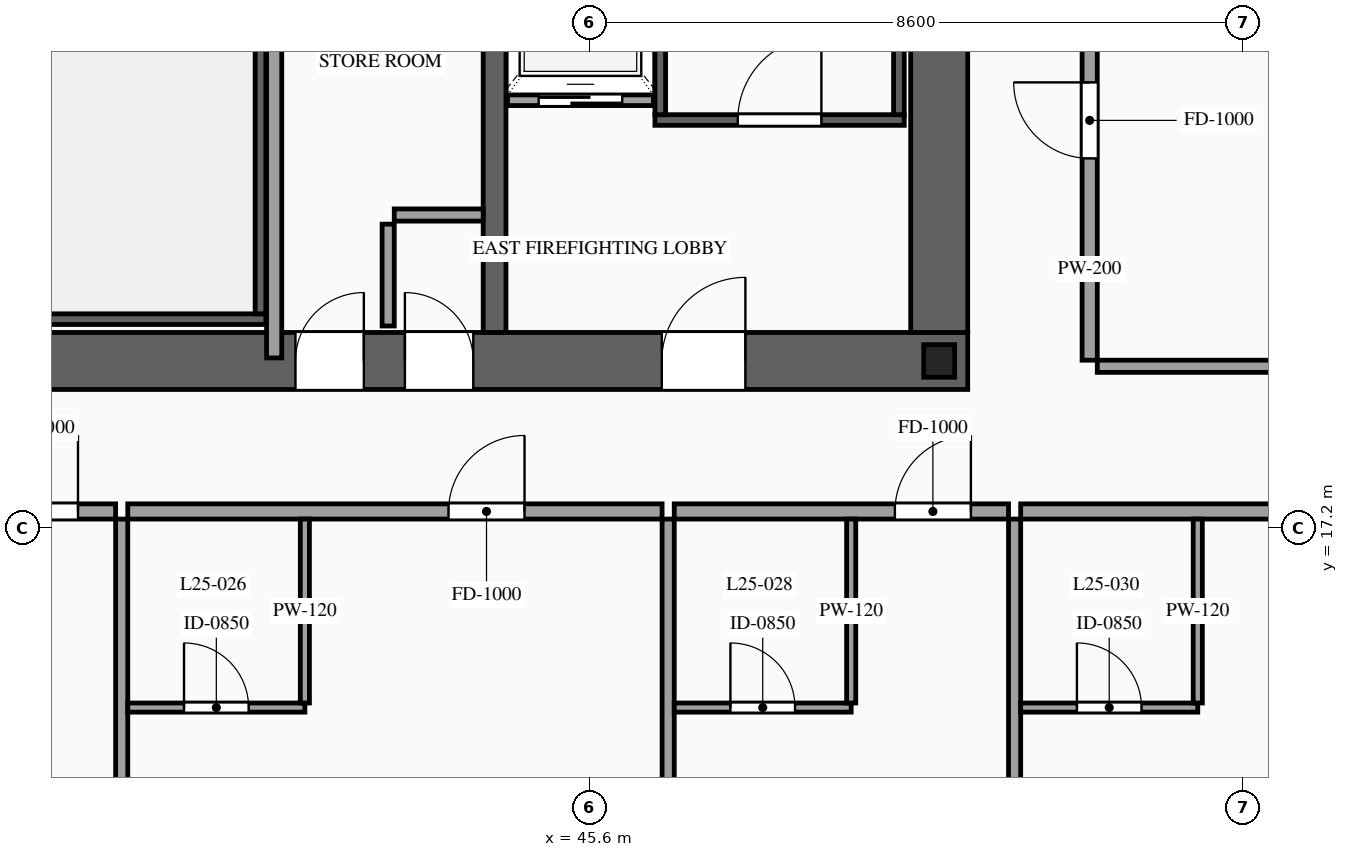
"""IFC4 building model, lengths in metres.
Left out: names, types, materials, properties, quantities, classifications, styles, units other than length and angle.
Written with IfcOpenShell. Run it as: python <this file> out.ifc"""

import sys

from ifc_helpers import new_model, si_unit, direction, frame, frame_2d, origin, origin_2d, place, context, subcontext, project, spatial, rectangle, i_section, extrude, source, transform, mapped, element, fill, save


model = new_model("IFC4")
c1 = context("Model", 3, precision=1e-05, world=origin(), true_north=direction((0.0, 1.0)))
c2 = subcontext(c1, "Body", "Model", "MODEL_VIEW")
j1 = project(units=[si_unit("LENGTHUNIT", "METRE"), si_unit("PLANEANGLEUNIT", "RADIAN")], contexts=[c1])
p1 = place(None, origin())
s1 = spatial("IfcSite", under=j1, at=p1, CompositionType="ELEMENT")
p2 = place(p1, origin())
s2 = spatial("IfcBuilding", under=s1, at=p2, CompositionType="ELEMENT")
p3 = place(p2, frame((0.0, 0.0, 97.4)))
s3 = spatial("IfcBuildingStorey", under=s2, at=p3, CompositionType="ELEMENT", Elevation=97.4)
p4 = place(p3, frame((23.425, 19.4, 0.0), z_axis=(0.0, 0.0, 1.0), x_axis=(1.0, 0.0, 0.0)))
e1 = element("IfcWall", 1, at=p4, inside=s3, PredefinedType="SHEAR", context=c2, shape_type="SweptSolid", body=[
    extrude(rectangle(XDim=27.15, YDim=0.75, at=frame_2d((13.575, 0.0))), origin(), (0.0, 0.0, 1.0), 3.6),
])
p5 = place(p4, frame((2.025, 0.0, 0.0)))
e2 = element("IfcOpeningElement", 2, at=p5, cuts=e1, PredefinedType="OPENING", context=c2, shape_type="SweptSolid", body=[
    extrude(rectangle(XDim=1.1, YDim=2.2, at=frame_2d((0.55, 1.1))), frame((0.0, 0.39, 0.0), z_axis=(0.0, -1.0, 0.0), x_axis=(1.0, 0.0, 0.0)), (0.0, 0.0, 1.0), 0.78),
])
p6 = place(p4, frame((9.925, 0.0, 0.0)))
e3 = element("IfcOpeningElement", 3, at=p6, cuts=e1, PredefinedType="OPENING", context=c2, shape_type="SweptSolid", body=[
    extrude(rectangle(XDim=1.1, YDim=2.2, at=frame_2d((0.55, 1.1))), frame((0.0, 0.39, 0.0), z_axis=(0.0, -1.0, 0.0), x_axis=(1.0, 0.0, 0.0)), (0.0, 0.0, 1.0), 0.78),
])
p7 = place(p4, frame((23.125, 0.0, 0.0)))
e4 = element("IfcOpeningElement", 4, at=p7, cuts=e1, PredefinedType="OPENING", context=c2, shape_type="SweptSolid", body=[
    extrude(rectangle(XDim=1.1, YDim=2.2, at=frame_2d((0.55, 1.1))), frame((0.0, 0.39, 0.0), z_axis=(0.0, -1.0, 0.0), x_axis=(1.0, 0.0, 0.0)), (0.0, 0.0, 1.0), 0.78),
])
p8 = place(p4, frame((19.745, 0.0, 0.0)))
e5 = element("IfcOpeningElement", 5, at=p8, cuts=e1, PredefinedType="OPENING", context=c2, shape_type="SweptSolid", body=[
    extrude(rectangle(XDim=0.9, YDim=2.15, at=frame_2d((0.45, 1.075))), frame((0.0, 0.39, 0.0), z_axis=(0.0, -1.0, 0.0), x_axis=(1.0, 0.0, 0.0)), (0.0, 0.0, 1.0), 0.78),
])
p9 = place(p4, frame((18.305, 0.0, 0.0)))
e6 = element("IfcOpeningElement", 6, at=p9, cuts=e1, PredefinedType="OPENING", context=c2, shape_type="SweptSolid", body=[
    extrude(rectangle(XDim=0.9, YDim=2.15, at=frame_2d((0.45, 1.075))), frame((0.0, 0.39, 0.0), z_axis=(0.0, -1.0, 0.0), x_axis=(1.0, 0.0, 0.0)), (0.0, 0.0, 1.0), 0.78),
])
m1 = source(origin(), c2, "Body", "SweptSolid", [
    extrude(rectangle(XDim=12.05, YDim=0.75, at=frame_2d((6.025, 0.0))), origin(), (0.0, 0.0, 1.0), 3.6),
])
p10 = place(p3, frame((50.2, 19.775, 0.0), z_axis=(0.0, 0.0, 1.0), x_axis=(0.0, 1.0, 0.0)))
e7 = element("IfcWall", 7, at=p10, inside=s3, PredefinedType="SHEAR", context=c2, shape_type="MappedRepresentation", body=[
    mapped(m1, transform((0.0, 0.0, 0.0), scale=1.0)),
])
m2 = source(origin(), c2, "Body", "SweptSolid", [
    extrude(rectangle(XDim=12.05, YDim=0.3, at=frame_2d((6.025, 0.0))), origin(), (0.0, 0.0, 1.0), 3.6),
])
p11 = place(p3, frame((44.35, 19.775, 0.0), z_axis=(0.0, 0.0, 1.0), x_axis=(0.0, 1.0, 0.0)))
e8 = element("IfcWall", 8, at=p11, inside=s3, PredefinedType="SOLIDWALL", context=c2, shape_type="MappedRepresentation", body=[
    mapped(m2, transform((0.0, 0.0, 0.0), scale=1.0)),
])
m3 = source(origin(), c2, "Body", "SweptSolid", [
    extrude(i_section(OverallWidth=0.407, OverallDepth=0.428, WebThickness=0.02, FlangeThickness=0.035, at=origin_2d()), origin(), (0.0, 0.0, 1.0), 3.6),
])
p12 = place(p3, frame((50.2, 19.4, 0.0), z_axis=(0.0, 0.0, 1.0), x_axis=(1.0, 0.0, 0.0)))
e9 = element("IfcColumn", 9, at=p12, inside=s3, PredefinedType="COLUMN", context=c2, shape_type="MappedRepresentation", body=[
    mapped(m3, transform((0.0, 0.0, 0.0), scale=1.0)),
])
p13 = place(p3, frame((44.52, 22.83, 0.0), z_axis=(0.0, 0.0, 1.0), x_axis=(1.0, 0.0, 0.0)))
e10 = element("IfcWall", 10, at=p13, inside=s3, PredefinedType="SOLIDWALL", context=c2, shape_type="SweptSolid", body=[
    extrude(rectangle(XDim=1.92, YDim=0.14, at=frame_2d((0.96, 0.0))), origin(), (0.0, 0.0, 1.0), 3.38),
])
p14 = place(p13, frame((0.41, 0.0, 0.0)))
e11 = element("IfcOpeningElement", 11, at=p14, cuts=e10, PredefinedType="OPENING", context=c2, shape_type="SweptSolid", body=[
    extrude(rectangle(XDim=1.1, YDim=2.2, at=frame_2d((0.55, 1.1))), frame((0.0, 0.085, 0.0), z_axis=(0.0, -1.0, 0.0), x_axis=(1.0, 0.0, 0.0)), (0.0, 0.0, 1.0), 0.17),
])
p15 = place(p3, frame((46.46, 22.57, 0.0), z_axis=(0.0, 0.0, 1.0), x_axis=(1.0, 0.0, 0.0)))
e12 = element("IfcWall", 12, at=p15, inside=s3, PredefinedType="SOLIDWALL", context=c2, shape_type="SweptSolid", body=[
    extrude(rectangle(XDim=3.28, YDim=0.14, at=frame_2d((1.64, 0.0))), origin(), (0.0, 0.0, 1.0), 3.38),
])
p16 = place(p15, frame((1.09, 0.0, 0.0)))
e13 = element("IfcOpeningElement", 13, at=p16, cuts=e12, PredefinedType="OPENING", context=c2, shape_type="SweptSolid", body=[
    extrude(rectangle(XDim=1.1, YDim=2.2, at=frame_2d((0.55, 1.1))), frame((0.0, 0.085, 0.0), z_axis=(0.0, -1.0, 0.0), x_axis=(1.0, 0.0, 0.0)), (0.0, 0.0, 1.0), 0.17),
])
m4 = source(origin(), c2, "Body", "SweptSolid", [
    extrude(rectangle(XDim=8.94, YDim=0.14, at=frame_2d((4.47, 0.0))), origin(), (0.0, 0.0, 1.0), 3.38),
])
for number, where, z_axis, x_axis in (
    (14, (46.53, 22.64, 0.0), (0.0, 0.0, 1.0), (0.0, 1.0, 0.0)),
    (15, (49.67, 22.64, 0.0), (0.0, 0.0, 1.0), (0.0, 1.0, 0.0)),
):
    element("IfcWall", number, at=place(p3, frame(where, z_axis=z_axis, x_axis=x_axis)), inside=s3, PredefinedType="SOLIDWALL", context=c2, shape_type="MappedRepresentation", body=[
        mapped(m4, transform((0.0, 0.0, 0.0), scale=1.0)),
    ])
m5 = source(origin(), c2, "Body", "SweptSolid", [
    extrude(rectangle(XDim=3.14, YDim=0.14, at=frame_2d((1.57, 0.0))), origin(), (0.0, 0.0, 1.0), 3.38),
])
p17 = place(p3, frame((38.2, 19.95, 0.0), z_axis=(0.0, 0.0, 1.0), x_axis=(1.0, 0.0, 0.0)))
e16 = element("IfcWall", 16, at=p17, inside=s3, PredefinedType="SOLIDWALL", context=c2, shape_type="MappedRepresentation", body=[
    mapped(m5, transform((0.0, 0.0, 0.0), scale=1.0)),
])
m6 = source(origin(), c2, "Body", "SweptSolid", [
    extrude(rectangle(XDim=8.94, YDim=0.14, at=frame_2d((4.47, 0.0))), origin(), (0.0, 0.0, 1.0), 3.38),
])
p18 = place(p3, frame((41.27, 20.02, 0.0), z_axis=(0.0, 0.0, 1.0), x_axis=(0.0, 1.0, 0.0)))
e17 = element("IfcWall", 17, at=p18, inside=s3, PredefinedType="SOLIDWALL", context=c2, shape_type="MappedRepresentation", body=[
    mapped(m6, transform((0.0, 0.0, 0.0), scale=1.0)),
])
m7 = source(origin(), c2, "Body", "SweptSolid", [
    extrude(rectangle(XDim=1.34, YDim=0.16, at=frame_2d((0.67, 0.0))), origin(), (0.0, 0.0, 1.0), 3.38),
])
p19 = place(p3, frame((42.95, 19.86, 0.0), z_axis=(0.0, 0.0, 1.0), x_axis=(0.0, 1.0, 0.0)))
e18 = element("IfcWall", 18, at=p19, inside=s3, PredefinedType="PARTITIONING", context=c2, shape_type="MappedRepresentation", body=[
    mapped(m7, transform((0.0, 0.0, 0.0), scale=1.0)),
])
m8 = source(origin(), c2, "Body", "SweptSolid", [
    extrude(rectangle(XDim=1.17, YDim=0.16, at=frame_2d((0.585, 0.0))), origin(), (0.0, 0.0, 1.0), 3.38),
])
p20 = place(p3, frame((43.03, 21.32, 0.0), z_axis=(0.0, 0.0, 1.0), x_axis=(1.0, 0.0, 0.0)))
e19 = element("IfcWall", 19, at=p20, inside=s3, PredefinedType="PARTITIONING", context=c2, shape_type="MappedRepresentation", body=[
    mapped(m8, transform((0.0, 0.0, 0.0), scale=1.0)),
])
m9 = source(origin(), c2, "Body", "SweptSolid", [
    extrude(rectangle(XDim=6.51, YDim=0.2, at=frame_2d((3.255, 0.0))), origin(), (0.0, 0.0, 1.0), 3.38),
])
p21 = place(p3, frame((41.45, 19.44, 0.0), z_axis=(0.0, 0.0, 1.0), x_axis=(0.0, 1.0, 0.0)))
e20 = element("IfcWall", 20, at=p21, inside=s3, PredefinedType="PARTITIONING", context=c2, shape_type="MappedRepresentation", body=[
    mapped(m9, transform((0.0, 0.0, 0.0), scale=1.0)),
])
p22 = place(p3, frame((34.965, 17.42, 0.0), z_axis=(0.0, 0.0, 1.0), x_axis=(1.0, 0.0, 0.0)))
e21 = element("IfcWall", 21, at=p22, inside=s3, PredefinedType="PARTITIONING", context=c2, shape_type="SweptSolid", body=[
    extrude(rectangle(XDim=4.399, YDim=0.2, at=frame_2d((2.199, 0.0))), origin(), (0.0, 0.0, 1.0), 3.38),
])
p23 = place(p22, frame((2.904, 0.0, 0.0)))
e22 = element("IfcOpeningElement", 22, at=p23, cuts=e21, PredefinedType="OPENING", context=c2, shape_type="SweptSolid", body=[
    extrude(rectangle(XDim=1.0, YDim=2.2, at=frame_2d((0.5, 1.1))), frame((0.0, 0.115, 0.0), z_axis=(0.0, -1.0, 0.0), x_axis=(1.0, 0.0, 0.0)), (0.0, 0.0, 1.0), 0.23),
])
m10 = source(origin(), c2, "Body", "SweptSolid", [
    extrude(rectangle(XDim=14.97, YDim=0.16, at=frame_2d((7.485, 0.0))), origin(), (0.0, 0.0, 1.0), 3.38),
])
p24 = place(p3, frame((39.444, 2.35, 0.0), z_axis=(0.0, 0.0, 1.0), x_axis=(0.0, 1.0, 0.0)))
e23 = element("IfcWall", 23, at=p24, inside=s3, PredefinedType="PARTITIONING", context=c2, shape_type="MappedRepresentation", body=[
    mapped(m10, transform((0.0, 0.0, 0.0), scale=1.0)),
])
p25 = place(p3, frame((39.524, 17.42, 0.0), z_axis=(0.0, 0.0, 1.0), x_axis=(1.0, 0.0, 0.0)))
e24 = element("IfcWall", 24, at=p25, inside=s3, PredefinedType="PARTITIONING", context=c2, shape_type="SweptSolid", body=[
    extrude(rectangle(XDim=7.03, YDim=0.2, at=frame_2d((3.515, 0.0))), origin(), (0.0, 0.0, 1.0), 3.38),
])
p26 = place(p25, frame((4.22, 0.0, 0.0)))
e25 = element("IfcOpeningElement", 25, at=p26, cuts=e24, PredefinedType="OPENING", context=c2, shape_type="SweptSolid", body=[
    extrude(rectangle(XDim=1.0, YDim=2.2, at=frame_2d((0.5, 1.1))), frame((0.0, 0.115, 0.0), z_axis=(0.0, -1.0, 0.0), x_axis=(1.0, 0.0, 0.0)), (0.0, 0.0, 1.0), 0.23),
])
p27 = place(p3, frame((46.634, 2.35, 0.0), z_axis=(0.0, 0.0, 1.0), x_axis=(0.0, 1.0, 0.0)))
e26 = element("IfcWall", 26, at=p27, inside=s3, PredefinedType="PARTITIONING", context=c2, shape_type="MappedRepresentation", body=[
    mapped(m10, transform((0.0, 0.0, 0.0), scale=1.0)),
])
p28 = place(p3, frame((39.524, 14.84, 0.0), z_axis=(0.0, 0.0, 1.0), x_axis=(1.0, 0.0, 0.0)))
e27 = element("IfcWall", 27, at=p28, inside=s3, PredefinedType="PARTITIONING", context=c2, shape_type="SweptSolid", body=[
    extrude(rectangle(XDim=2.33, YDim=0.12, at=frame_2d((1.165, 0.0))), origin(), (0.0, 0.0, 1.0), 3.38),
])
p29 = place(p28, frame((0.74, 0.0, 0.0)))
e28 = element("IfcOpeningElement", 28, at=p29, cuts=e27, PredefinedType="OPENING", context=c2, shape_type="SweptSolid", body=[
    extrude(rectangle(XDim=0.85, YDim=2.1, at=frame_2d((0.425, 1.05))), frame((0.0, 0.075, 0.0), z_axis=(0.0, -1.0, 0.0), x_axis=(1.0, 0.0, 0.0)), (0.0, 0.0, 1.0), 0.15),
])
m11 = source(origin(), c2, "Body", "SweptSolid", [
    extrude(rectangle(XDim=2.42, YDim=0.12, at=frame_2d((1.21, 0.0))), origin(), (0.0, 0.0, 1.0), 3.38),
])
p30 = place(p3, frame((41.854, 14.9, 0.0), z_axis=(0.0, 0.0, 1.0), x_axis=(0.0, 1.0, 0.0)))
e29 = element("IfcWall", 29, at=p30, inside=s3, PredefinedType="PARTITIONING", context=c2, shape_type="MappedRepresentation", body=[
    mapped(m11, transform((0.0, 0.0, 0.0), scale=1.0)),
])
p31 = place(p3, frame((46.714, 17.42, 0.0), z_axis=(0.0, 0.0, 1.0), x_axis=(1.0, 0.0, 0.0)))
e30 = element("IfcWall", 30, at=p31, inside=s3, PredefinedType="PARTITIONING", context=c2, shape_type="SweptSolid", body=[
    extrude(rectangle(XDim=4.398, YDim=0.2, at=frame_2d((2.199, 0.0))), origin(), (0.0, 0.0, 1.0), 3.38),
])
p32 = place(p31, frame((2.903, 0.0, 0.0)))
e31 = element("IfcOpeningElement", 31, at=p32, cuts=e30, PredefinedType="OPENING", context=c2, shape_type="SweptSolid", body=[
    extrude(rectangle(XDim=1.0, YDim=2.2, at=frame_2d((0.5, 1.1))), frame((0.0, 0.115, 0.0), z_axis=(0.0, -1.0, 0.0), x_axis=(1.0, 0.0, 0.0)), (0.0, 0.0, 1.0), 0.23),
])
p33 = place(p3, frame((51.192, 2.35, 0.0), z_axis=(0.0, 0.0, 1.0), x_axis=(0.0, 1.0, 0.0)))
e32 = element("IfcWall", 32, at=p33, inside=s3, PredefinedType="PARTITIONING", context=c2, shape_type="MappedRepresentation", body=[
    mapped(m10, transform((0.0, 0.0, 0.0), scale=1.0)),
])
p34 = place(p3, frame((46.714, 14.84, 0.0), z_axis=(0.0, 0.0, 1.0), x_axis=(1.0, 0.0, 0.0)))
e33 = element("IfcWall", 33, at=p34, inside=s3, PredefinedType="PARTITIONING", context=c2, shape_type="SweptSolid", body=[
    extrude(rectangle(XDim=2.328, YDim=0.12, at=frame_2d((1.164, 0.0))), origin(), (0.0, 0.0, 1.0), 3.38),
])
p35 = place(p34, frame((0.739, 0.0, 0.0)))
e34 = element("IfcOpeningElement", 34, at=p35, cuts=e33, PredefinedType="OPENING", context=c2, shape_type="SweptSolid", body=[
    extrude(rectangle(XDim=0.85, YDim=2.1, at=frame_2d((0.425, 1.05))), frame((0.0, 0.075, 0.0), z_axis=(0.0, -1.0, 0.0), x_axis=(1.0, 0.0, 0.0)), (0.0, 0.0, 1.0), 0.15),
])
p36 = place(p3, frame((49.042, 14.9, 0.0), z_axis=(0.0, 0.0, 1.0), x_axis=(0.0, 1.0, 0.0)))
e35 = element("IfcWall", 35, at=p36, inside=s3, PredefinedType="PARTITIONING", context=c2, shape_type="MappedRepresentation", body=[
    mapped(m11, transform((0.0, 0.0, 0.0), scale=1.0)),
])
p37 = place(p3, frame((51.272, 17.42, 0.0), z_axis=(0.0, 0.0, 1.0), x_axis=(1.0, 0.0, 0.0)))
e36 = element("IfcWall", 36, at=p37, inside=s3, PredefinedType="PARTITIONING", context=c2, shape_type="SweptSolid", body=[
    extrude(rectangle(XDim=6.288, YDim=0.2, at=frame_2d((3.144, 0.0))), origin(), (0.0, 0.0, 1.0), 3.38),
])
p38 = place(p37, frame((3.849, 0.0, 0.0)))
e37 = element("IfcOpeningElement", 37, at=p38, cuts=e36, PredefinedType="OPENING", context=c2, shape_type="SweptSolid", body=[
    extrude(rectangle(XDim=1.0, YDim=2.2, at=frame_2d((0.5, 1.1))), frame((0.0, 0.115, 0.0), z_axis=(0.0, -1.0, 0.0), x_axis=(1.0, 0.0, 0.0)), (0.0, 0.0, 1.0), 0.23),
])
p39 = place(p3, frame((51.272, 14.84, 0.0), z_axis=(0.0, 0.0, 1.0), x_axis=(1.0, 0.0, 0.0)))
e38 = element("IfcWall", 38, at=p39, inside=s3, PredefinedType="PARTITIONING", context=c2, shape_type="SweptSolid", body=[
    extrude(rectangle(XDim=2.33, YDim=0.12, at=frame_2d((1.165, 0.0))), origin(), (0.0, 0.0, 1.0), 3.38),
])
p40 = place(p39, frame((0.74, 0.0, 0.0)))
e39 = element("IfcOpeningElement", 39, at=p40, cuts=e38, PredefinedType="OPENING", context=c2, shape_type="SweptSolid", body=[
    extrude(rectangle(XDim=0.85, YDim=2.1, at=frame_2d((0.425, 1.05))), frame((0.0, 0.075, 0.0), z_axis=(0.0, -1.0, 0.0), x_axis=(1.0, 0.0, 0.0)), (0.0, 0.0, 1.0), 0.15),
])
p41 = place(p3, frame((53.602, 14.9, 0.0), z_axis=(0.0, 0.0, 1.0), x_axis=(0.0, 1.0, 0.0)))
e40 = element("IfcWall", 40, at=p41, inside=s3, PredefinedType="PARTITIONING", context=c2, shape_type="MappedRepresentation", body=[
    mapped(m11, transform((0.0, 0.0, 0.0), scale=1.0)),
])
p42 = place(p3, frame((52.18, 19.41, 0.0), z_axis=(0.0, 0.0, 1.0), x_axis=(0.0, 1.0, 0.0)))
e41 = element("IfcWall", 41, at=p42, inside=s3, PredefinedType="PARTITIONING", context=c2, shape_type="SweptSolid", body=[
    extrude(rectangle(XDim=6.31, YDim=0.2, at=frame_2d((3.155, 0.0))), origin(), (0.0, 0.0, 1.0), 3.38),
])
p43 = place(p42, frame((2.655, 0.0, 0.0)))
e42 = element("IfcOpeningElement", 42, at=p43, cuts=e41, PredefinedType="OPENING", context=c2, shape_type="SweptSolid", body=[
    extrude(rectangle(XDim=1.0, YDim=2.2, at=frame_2d((0.5, 1.1))), frame((0.0, 0.115, 0.0), z_axis=(0.0, -1.0, 0.0), x_axis=(1.0, 0.0, 0.0)), (0.0, 0.0, 1.0), 0.23),
])
m12 = source(origin(), c2, "Body", "SweptSolid", [
    extrude(rectangle(XDim=8.17, YDim=0.16, at=frame_2d((4.085, 0.0))), origin(), (0.0, 0.0, 1.0), 2.875),
])
p44 = place(p3, frame((52.28, 19.33, 0.0), z_axis=(0.0, 0.0, 1.0), x_axis=(1.0, 0.0, 0.0)))
e43 = element("IfcWall", 43, at=p44, inside=s3, PredefinedType="PARTITIONING", context=c2, shape_type="MappedRepresentation", body=[
    mapped(m12, transform((0.0, 0.0, 0.0), scale=1.0)),
])
m13 = source(origin(), c2, "Body", "SweptSolid", [
    extrude(rectangle(XDim=1.1, YDim=2.2, at=frame_2d((0.55, 1.1))), frame((0.0, 0.025, 0.0), z_axis=(0.0, -1.0, 0.0), x_axis=(1.0, 0.0, 0.0)), (0.0, 0.0, 1.0), 0.05),
])
p45 = place(p14, origin())
e44 = element("IfcDoor", 44, at=p45, inside=s3, OperationType="SLIDING_TO_RIGHT", PredefinedType="DOOR", context=c2, shape_type="MappedRepresentation", body=[
    mapped(m13, transform((0.0, 0.0, 0.0), scale=1.0)),
])
fill(e11, e44)
m14 = source(origin(), c2, "Body", "SweptSolid", [
    extrude(rectangle(XDim=1.1, YDim=2.2, at=frame_2d((0.55, 1.1))), frame((0.0, 0.025, 0.0), z_axis=(0.0, -1.0, 0.0), x_axis=(1.0, 0.0, 0.0)), (0.0, 0.0, 1.0), 0.05),
])
p46 = place(p16, origin())
e45 = element("IfcDoor", 45, at=p46, inside=s3, OperationType="SINGLE_SWING_RIGHT", PredefinedType="DOOR", context=c2, shape_type="MappedRepresentation", body=[
    mapped(m14, transform((0.0, 0.0, 0.0), scale=1.0)),
])
fill(e13, e45)
p47 = place(p7, origin())
e46 = element("IfcDoor", 46, at=p47, inside=s3, OperationType="SINGLE_SWING_RIGHT", PredefinedType="DOOR", context=c2, shape_type="MappedRepresentation", body=[
    mapped(m14, transform((0.0, 0.0, 0.0), scale=1.0)),
])
fill(e4, e46)
m15 = source(origin(), c2, "Body", "SweptSolid", [
    extrude(rectangle(XDim=0.9, YDim=2.15, at=frame_2d((0.45, 1.075))), frame((0.0, 0.025, 0.0), z_axis=(0.0, -1.0, 0.0), x_axis=(1.0, 0.0, 0.0)), (0.0, 0.0, 1.0), 0.05),
])
p48 = place(p8, origin())
e47 = element("IfcDoor", 47, at=p48, inside=s3, OperationType="SINGLE_SWING_LEFT", PredefinedType="DOOR", context=c2, shape_type="MappedRepresentation", body=[
    mapped(m15, transform((0.0, 0.0, 0.0), scale=1.0)),
])
fill(e5, e47)
p49 = place(p9, origin())
e48 = element("IfcDoor", 48, at=p49, inside=s3, OperationType="SINGLE_SWING_RIGHT", PredefinedType="DOOR", context=c2, shape_type="MappedRepresentation", body=[
    mapped(m15, transform((0.0, 0.0, 0.0), scale=1.0)),
])
fill(e6, e48)
m16 = source(origin(), c2, "Body", "SweptSolid", [
    extrude(rectangle(XDim=1.0, YDim=2.2, at=frame_2d((0.5, 1.1))), frame((0.0, 0.025, 0.0), z_axis=(0.0, -1.0, 0.0), x_axis=(1.0, 0.0, 0.0)), (0.0, 0.0, 1.0), 0.05),
])
p50 = place(p23, origin())
e49 = element("IfcDoor", 49, at=p50, inside=s3, OperationType="SINGLE_SWING_RIGHT", PredefinedType="DOOR", context=c2, shape_type="MappedRepresentation", body=[
    mapped(m16, transform((0.0, 0.0, 0.0), scale=1.0)),
])
fill(e22, e49)
p51 = place(p26, origin())
e50 = element("IfcDoor", 50, at=p51, inside=s3, OperationType="SINGLE_SWING_RIGHT", PredefinedType="DOOR", context=c2, shape_type="MappedRepresentation", body=[
    mapped(m16, transform((0.0, 0.0, 0.0), scale=1.0)),
])
fill(e25, e50)
m17 = source(origin(), c2, "Body", "SweptSolid", [
    extrude(rectangle(XDim=0.85, YDim=2.1, at=frame_2d((0.425, 1.05))), frame((0.0, 0.025, 0.0), z_axis=(0.0, -1.0, 0.0), x_axis=(1.0, 0.0, 0.0)), (0.0, 0.0, 1.0), 0.05),
])
p52 = place(p29, origin())
e51 = element("IfcDoor", 51, at=p52, inside=s3, OperationType="SINGLE_SWING_LEFT", PredefinedType="DOOR", context=c2, shape_type="MappedRepresentation", body=[
    mapped(m17, transform((0.0, 0.0, 0.0), scale=1.0)),
])
fill(e28, e51)
p53 = place(p32, origin())
e52 = element("IfcDoor", 52, at=p53, inside=s3, OperationType="SINGLE_SWING_RIGHT", PredefinedType="DOOR", context=c2, shape_type="MappedRepresentation", body=[
    mapped(m16, transform((0.0, 0.0, 0.0), scale=1.0)),
])
fill(e31, e52)
p54 = place(p35, origin())
e53 = element("IfcDoor", 53, at=p54, inside=s3, OperationType="SINGLE_SWING_LEFT", PredefinedType="DOOR", context=c2, shape_type="MappedRepresentation", body=[
    mapped(m17, transform((0.0, 0.0, 0.0), scale=1.0)),
])
fill(e34, e53)
p55 = place(p40, origin())
e54 = element("IfcDoor", 54, at=p55, inside=s3, OperationType="SINGLE_SWING_LEFT", PredefinedType="DOOR", context=c2, shape_type="MappedRepresentation", body=[
    mapped(m17, transform((0.0, 0.0, 0.0), scale=1.0)),
])
fill(e39, e54)
p56 = place(p43, origin())
e55 = element("IfcDoor", 55, at=p56, inside=s3, OperationType="SINGLE_SWING_RIGHT", PredefinedType="DOOR", context=c2, shape_type="MappedRepresentation", body=[
    mapped(m16, transform((0.0, 0.0, 0.0), scale=1.0)),
])
fill(e42, e55)
save(model, sys.argv[1])
